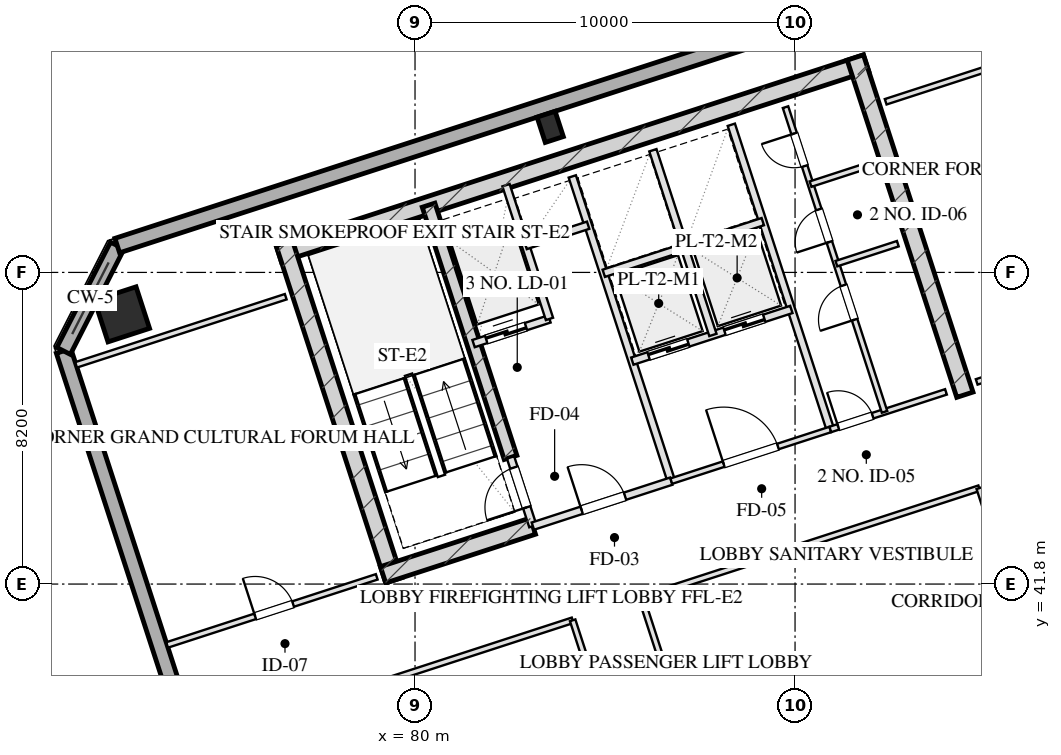
"""IFC4 building model, lengths in metres.
Left out: names, types, materials, properties, quantities, classifications, styles, units other than length and angle.
Written with IfcOpenShell. Run it as: python <this file> out.ifc"""

import sys

from ifc_helpers import new_model, si_unit, direction, frame, frame_2d, origin, origin_2d, place, context, subcontext, project, spatial, rectangle, hollow_rectangle, extrude, element, fill, save


model = new_model("IFC4")
c1 = context("Model", 3, precision=1e-05, world=origin(), true_north=direction((0.0, 1.0)))
c2 = subcontext(c1, "Body", "Model", "MODEL_VIEW")
j1 = project(units=[si_unit("LENGTHUNIT", "METRE"), si_unit("PLANEANGLEUNIT", "RADIAN")], contexts=[c1])
p1 = place(None, origin())
s1 = spatial("IfcSite", under=j1, at=p1, CompositionType="ELEMENT")
p2 = place(p1, origin())
s2 = spatial("IfcBuilding", under=s1, at=p2, CompositionType="ELEMENT")
p3 = place(p2, frame((0.0, 0.0, 202.4)))
s3 = spatial("IfcBuildingStorey", under=s2, at=p3, CompositionType="ELEMENT", Elevation=202.4)
p4 = place(p3, frame((76.415, 50.489, 0.0), z_axis=(0.0, 0.0, 1.0), x_axis=(0.951056810414, 0.309016089169, 0.0)))
e1 = element("IfcWall", 1, at=p4, inside=s3, PredefinedType="SHEAR", context=c2, shape_type="SweptSolid", body=[
    extrude(rectangle(XDim=16.25, YDim=0.45, at=frame_2d((8.125, 0.0))), origin(), (0.0, 0.0, 1.0), 3.45),
])
for number, where, z_axis, x_axis in (
    (2, (79.442, 41.899, 0.0), (0.0, 0.0, 1.0), (-0.309, 0.951, 0.0)),
    (3, (94.469, 46.781, 0.0), (0.0, 0.0, 1.0), (-0.309, 0.951, 0.0)),
):
    element("IfcWall", number, at=place(p3, frame(where, z_axis=z_axis, x_axis=x_axis)), inside=s3, PredefinedType="SHEAR", context=c2, shape_type="SweptSolid", body=[
        extrude(rectangle(XDim=9.33, YDim=0.45, at=frame_2d((4.665, 0.0))), origin(), (0.0, 0.0, 1.0), 3.45),
    ])
p5 = place(p3, frame((82.514, 45.131, 0.0), z_axis=(0.0, 0.0, 1.0), x_axis=(-0.308988790936, 0.951065679686, 0.0)))
e4 = element("IfcWall", 4, at=p5, inside=s3, PredefinedType="SHEAR", context=c2, shape_type="SweptSolid", body=[
    extrude(rectangle(XDim=6.98, YDim=0.35, at=frame_2d((3.49, 0.0))), origin(), (0.0, 0.0, 1.0), 3.45),
])
p6 = place(p3, frame((79.159, 42.043, 0.0), z_axis=(0.0, 0.0, 1.0), x_axis=(0.951047485828, 0.309044785913, 0.0)))
e5 = element("IfcWall", 5, at=p6, inside=s3, PredefinedType="SHEAR", context=c2, shape_type="SweptSolid", body=[
    extrude(rectangle(XDim=4.145, YDim=0.45, at=frame_2d((2.073, 0.0))), origin(), (0.0, 0.0, 1.0), 3.45),
])
for number, where, z_axis, x_axis in (
    (6, (95.572, 56.461, 0.0), (0.0, 0.0, 1.0), (0.951, 0.309, 0.0)),
    (7, (72.29, 48.896, 0.0), (0.0, 0.0, 1.0), (0.951, 0.309, 0.0)),
):
    element("IfcColumn", number, at=place(p3, frame(where, z_axis=z_axis, x_axis=x_axis)), inside=s3, PredefinedType="COLUMN", context=c2, shape_type="SweptSolid", body=[
        extrude(hollow_rectangle(XDim=1.15, YDim=1.15, WallThickness=0.04, at=origin_2d()), origin(), (0.0, 0.0, 1.0), 3.451),
    ])
p7 = place(p3, frame((83.557, 53.83, 0.0), z_axis=(0.0, 0.0, 1.0), x_axis=(0.951056516295, 0.309016994375, 0.0)))
e8 = element("IfcColumn", 8, at=p7, inside=s3, PredefinedType="COLUMN", context=c2, shape_type="SweptSolid", body=[
    extrude(hollow_rectangle(XDim=0.5, YDim=0.7, WallThickness=0.025, at=origin_2d()), origin(), (0.0, 0.0, 1.0), 3.451),
])
p8 = place(p3, frame((82.618, 11.414, 0.0), z_axis=(0.0, 0.0, 1.0), x_axis=(-0.309016491071, 0.951056679828, 0.0)))
e9 = element("IfcWall", 9, at=p8, inside=s3, PredefinedType="SOLIDWALL", context=c2, shape_type="SweptSolid", body=[
    extrude(rectangle(XDim=38.4, YDim=0.4, at=frame_2d((19.2, 0.0))), origin(), (0.0, 0.0, 1.0), 2.61),
])
p9 = place(p8, frame((11.75, 0.0, 0.75)))
e10 = element("IfcOpeningElement", 10, at=p9, cuts=e9, PredefinedType="OPENING", context=c2, shape_type="SweptSolid", body=[
    extrude(rectangle(XDim=2.1, YDim=1.46, at=frame_2d((1.05, 0.73))), frame((0.0, 0.21, 0.0), z_axis=(0.0, -1.0, 0.0), x_axis=(1.0, 0.0, 0.0)), (0.0, 0.0, 1.0), 0.42),
])
p10 = place(p8, frame((15.55, 0.0, 0.75)))
e11 = element("IfcOpeningElement", 11, at=p10, cuts=e9, PredefinedType="OPENING", context=c2, shape_type="SweptSolid", body=[
    extrude(rectangle(XDim=2.1, YDim=1.46, at=frame_2d((1.05, 0.73))), frame((0.0, 0.21, 0.0), z_axis=(0.0, -1.0, 0.0), x_axis=(1.0, 0.0, 0.0)), (0.0, 0.0, 1.0), 0.42),
])
p11 = place(p8, frame((20.75, 0.0, 0.75)))
e12 = element("IfcOpeningElement", 12, at=p11, cuts=e9, PredefinedType="OPENING", context=c2, shape_type="SweptSolid", body=[
    extrude(rectangle(XDim=2.1, YDim=1.46, at=frame_2d((1.05, 0.73))), frame((0.0, 0.21, 0.0), z_axis=(0.0, -1.0, 0.0), x_axis=(1.0, 0.0, 0.0)), (0.0, 0.0, 1.0), 0.42),
])
p12 = place(p8, frame((24.55, 0.0, 0.75)))
e13 = element("IfcOpeningElement", 13, at=p12, cuts=e9, PredefinedType="OPENING", context=c2, shape_type="SweptSolid", body=[
    extrude(rectangle(XDim=2.1, YDim=1.46, at=frame_2d((1.05, 0.73))), frame((0.0, 0.21, 0.0), z_axis=(0.0, -1.0, 0.0), x_axis=(1.0, 0.0, 0.0)), (0.0, 0.0, 1.0), 0.42),
])
p13 = place(p3, frame((70.752, 47.934, 0.0), z_axis=(0.0, 0.0, 1.0), x_axis=(0.453949291228, 0.891027519774, 0.0)))
e14 = element("IfcWall", 14, at=p13, inside=s3, PredefinedType="SOLIDWALL", context=c2, shape_type="SweptSolid", body=[
    extrude(rectangle(XDim=3.111, YDim=0.4, at=frame_2d((1.556, 0.0))), origin(), (0.0, 0.0, 1.0), 2.61),
])
p14 = place(p3, frame((72.165, 50.706, 0.0), z_axis=(0.0, 0.0, 1.0), x_axis=(0.951058012937, 0.309012388148, 0.0)))
e15 = element("IfcWall", 15, at=p14, inside=s3, PredefinedType="SOLIDWALL", context=c2, shape_type="SweptSolid", body=[
    extrude(rectangle(XDim=23.6, YDim=0.4, at=frame_2d((11.8, 0.0))), origin(), (0.0, 0.0, 1.0), 2.61),
])
p15 = place(p3, frame((83.101, 43.324, 0.0), z_axis=(0.0, 0.0, 1.0), x_axis=(-0.309048298632, 0.951046344356, 0.0)))
e16 = element("IfcWall", 16, at=p15, inside=s3, PredefinedType="PARTITIONING", context=c2, shape_type="SweptSolid", body=[
    extrude(rectangle(XDim=1.9, YDim=0.2, at=frame_2d((0.95, 0.0))), origin(), (0.0, 0.0, 1.0), 3.175),
])
p16 = place(p15, frame((0.52, 0.0, 0.0)))
e17 = element("IfcOpeningElement", 17, at=p16, cuts=e16, PredefinedType="OPENING", context=c2, shape_type="SweptSolid", body=[
    extrude(rectangle(XDim=1.1, YDim=2.05, at=frame_2d((0.55, 1.025))), frame((0.0, 0.11, 0.0), z_axis=(0.0, -1.0, 0.0), x_axis=(1.0, 0.0, 0.0)), (0.0, 0.0, 1.0), 0.22),
])
p17 = place(p3, frame((86.743, 44.508, 0.0), z_axis=(0.0, 0.0, 1.0), x_axis=(-0.309016001439, 0.951056838919, 0.0)))
e18 = element("IfcWall", 18, at=p17, inside=s3, PredefinedType="PARTITIONING", context=c2, shape_type="SweptSolid", body=[
    extrude(rectangle(XDim=8.43, YDim=0.2, at=frame_2d((4.215, 0.0))), origin(), (0.0, 0.0, 1.0), 3.175),
])
p18 = place(p3, frame((83.101, 43.324, 0.0), z_axis=(0.0, 0.0, 1.0), x_axis=(0.951052804469, 0.309028417967, 0.0)))
e19 = element("IfcWall", 19, at=p18, inside=s3, PredefinedType="PARTITIONING", context=c2, shape_type="SweptSolid", body=[
    extrude(rectangle(XDim=3.83, YDim=0.2, at=frame_2d((1.915, 0.0))), origin(), (0.0, 0.0, 1.0), 3.175),
])
p19 = place(p18, frame((1.35, 0.0, 0.0)))
e20 = element("IfcOpeningElement", 20, at=p19, cuts=e19, PredefinedType="OPENING", context=c2, shape_type="SweptSolid", body=[
    extrude(rectangle(XDim=1.2, YDim=2.05, at=frame_2d((0.6, 1.025))), frame((0.0, 0.11, 0.0), z_axis=(0.0, -1.0, 0.0), x_axis=(1.0, 0.0, 0.0)), (0.0, 0.0, 1.0), 0.22),
])
p20 = place(p3, frame((81.54, 48.127, 0.0), z_axis=(0.0, 0.0, 1.0), x_axis=(0.951062257173, 0.308999325213, 0.0)))
e21 = element("IfcWall", 21, at=p20, inside=s3, PredefinedType="PARTITIONING", context=c2, shape_type="SweptSolid", body=[
    extrude(rectangle(XDim=2.1, YDim=0.2, at=frame_2d((1.05, 0.0))), origin(), (0.0, 0.0, 1.0), 3.175),
])
p21 = place(p20, frame((0.35, 0.0, 0.0)))
e22 = element("IfcOpeningElement", 22, at=p21, cuts=e21, PredefinedType="OPENING", context=c2, shape_type="SweptSolid", body=[
    extrude(rectangle(XDim=1.1, YDim=2.05, at=frame_2d((0.55, 1.025))), frame((0.0, 0.11, 0.0), z_axis=(0.0, -1.0, 0.0), x_axis=(1.0, 0.0, 0.0)), (0.0, 0.0, 1.0), 0.22),
])
p22 = place(p3, frame((83.538, 48.776, 0.0), z_axis=(0.0, 0.0, 1.0), x_axis=(-0.3089935693, 0.951064127245, 0.0)))
e23 = element("IfcWall", 23, at=p22, inside=s3, PredefinedType="PARTITIONING", context=c2, shape_type="SweptSolid", body=[
    extrude(rectangle(XDim=3.7, YDim=0.2, at=frame_2d((1.85, 0.0))), origin(), (0.0, 0.0, 1.0), 3.175),
])
p23 = place(p3, frame((82.91, 50.707, 0.0), z_axis=(0.0, 0.0, 1.0), x_axis=(0.951041328149, 0.309063734775, 0.0)))
e24 = element("IfcWall", 24, at=p23, inside=s3, PredefinedType="PARTITIONING", context=c2, shape_type="SweptSolid", body=[
    extrude(rectangle(XDim=1.73, YDim=0.2, at=frame_2d((0.865, 0.0))), origin(), (0.0, 0.0, 1.0), 3.175),
])
p24 = place(p3, frame((90.928, 45.868, 0.0), z_axis=(0.0, 0.0, 1.0), x_axis=(-0.309042196757, 0.951048327176, 0.0)))
e25 = element("IfcWall", 25, at=p24, inside=s3, PredefinedType="PARTITIONING", context=c2, shape_type="SweptSolid", body=[
    extrude(rectangle(XDim=8.43, YDim=0.2, at=frame_2d((4.215, 0.0))), origin(), (0.0, 0.0, 1.0), 3.175),
])
p25 = place(p3, frame((86.743, 44.508, 0.0), z_axis=(0.0, 0.0, 1.0), x_axis=(0.951063829732, 0.308994485023, 0.0)))
e26 = element("IfcWall", 26, at=p25, inside=s3, PredefinedType="PARTITIONING", context=c2, shape_type="SweptSolid", body=[
    extrude(rectangle(XDim=4.4, YDim=0.15, at=frame_2d((2.2, 0.0))), origin(), (0.0, 0.0, 1.0), 3.175),
])
p26 = place(p25, frame((1.45, 0.0, 0.0)))
e27 = element("IfcOpeningElement", 27, at=p26, cuts=e26, PredefinedType="OPENING", context=c2, shape_type="SweptSolid", body=[
    extrude(rectangle(XDim=1.5, YDim=2.05, at=frame_2d((0.75, 1.025))), frame((0.0, 0.085, 0.0), z_axis=(0.0, -1.0, 0.0), x_axis=(1.0, 0.0, 0.0)), (0.0, 0.0, 1.0), 0.17),
])
p27 = place(p3, frame((85.718, 47.666, 0.0), z_axis=(0.0, 0.0, 1.0), x_axis=(0.951058531764, 0.30901079133, 0.0)))
e28 = element("IfcWall", 28, at=p27, inside=s3, PredefinedType="PARTITIONING", context=c2, shape_type="SweptSolid", body=[
    extrude(rectangle(XDim=4.4, YDim=0.2, at=frame_2d((2.2, 0.0))), origin(), (0.0, 0.0, 1.0), 3.175),
])
p28 = place(p27, frame((0.45, 0.0, 0.0)))
e29 = element("IfcOpeningElement", 29, at=p28, cuts=e28, PredefinedType="OPENING", context=c2, shape_type="SweptSolid", body=[
    extrude(rectangle(XDim=1.1, YDim=2.05, at=frame_2d((0.55, 1.025))), frame((0.0, 0.11, 0.0), z_axis=(0.0, -1.0, 0.0), x_axis=(1.0, 0.0, 0.0)), (0.0, 0.0, 1.0), 0.22),
])
p29 = place(p27, frame((2.55, 0.0, 0.0)))
e30 = element("IfcOpeningElement", 30, at=p29, cuts=e28, PredefinedType="OPENING", context=c2, shape_type="SweptSolid", body=[
    extrude(rectangle(XDim=1.1, YDim=2.05, at=frame_2d((0.55, 1.025))), frame((0.0, 0.11, 0.0), z_axis=(0.0, -1.0, 0.0), x_axis=(1.0, 0.0, 0.0)), (0.0, 0.0, 1.0), 0.22),
])
p30 = place(p3, frame((87.838, 48.354, 0.0), z_axis=(0.0, 0.0, 1.0), x_axis=(-0.3090093719, 0.951058992953, 0.0)))
e31 = element("IfcWall", 31, at=p30, inside=s3, PredefinedType="PARTITIONING", context=c2, shape_type="SweptSolid", body=[
    extrude(rectangle(XDim=5.11, YDim=0.2, at=frame_2d((2.555, 0.0))), origin(), (0.0, 0.0, 1.0), 3.175),
])
p31 = place(p3, frame((84.967, 49.977, 0.0), z_axis=(0.0, 0.0, 1.0), x_axis=(0.951063829732, 0.308994485023, 0.0)))
e32 = element("IfcWall", 32, at=p31, inside=s3, PredefinedType="PARTITIONING", context=c2, shape_type="SweptSolid", body=[
    extrude(rectangle(XDim=4.4, YDim=0.2, at=frame_2d((2.2, 0.0))), origin(), (0.0, 0.0, 1.0), 3.175),
])
p32 = place(p3, frame((90.928, 45.868, 0.0), z_axis=(0.0, 0.0, 1.0), x_axis=(0.951059297078, 0.309008435874, 0.0)))
e33 = element("IfcWall", 33, at=p32, inside=s3, PredefinedType="PARTITIONING", context=c2, shape_type="SweptSolid", body=[
    extrude(rectangle(XDim=3.2, YDim=0.15, at=frame_2d((1.6, 0.0))), origin(), (0.0, 0.0, 1.0), 3.175),
])
p33 = place(p32, frame((0.22, 0.0, 0.0)))
e34 = element("IfcOpeningElement", 34, at=p33, cuts=e33, PredefinedType="OPENING", context=c2, shape_type="SweptSolid", body=[
    extrude(rectangle(XDim=0.95, YDim=2.05, at=frame_2d((0.475, 1.025))), frame((0.0, 0.085, 0.0), z_axis=(0.0, -1.0, 0.0), x_axis=(1.0, 0.0, 0.0)), (0.0, 0.0, 1.0), 0.17),
])
p34 = place(p3, frame((92.355, 46.331, 0.0), z_axis=(0.0, 0.0, 1.0), x_axis=(-0.309007490203, 0.951059604335, 0.0)))
e35 = element("IfcWall", 35, at=p34, inside=s3, PredefinedType="PARTITIONING", context=c2, shape_type="SweptSolid", body=[
    extrude(rectangle(XDim=8.43, YDim=0.15, at=frame_2d((4.215, 0.0))), origin(), (0.0, 0.0, 1.0), 3.175),
])
p35 = place(p34, frame((2.55, 0.0, 0.0)))
e36 = element("IfcOpeningElement", 36, at=p35, cuts=e35, PredefinedType="OPENING", context=c2, shape_type="SweptSolid", body=[
    extrude(rectangle(XDim=0.95, YDim=2.05, at=frame_2d((0.475, 1.025))), frame((0.0, 0.085, 0.0), z_axis=(0.0, -1.0, 0.0), x_axis=(1.0, 0.0, 0.0)), (0.0, 0.0, 1.0), 0.17),
])
p36 = place(p34, frame((4.7, 0.0, 0.0)))
e37 = element("IfcOpeningElement", 37, at=p36, cuts=e35, PredefinedType="OPENING", context=c2, shape_type="SweptSolid", body=[
    extrude(rectangle(XDim=0.9, YDim=2.05, at=frame_2d((0.45, 1.025))), frame((0.0, 0.085, 0.0), z_axis=(0.0, -1.0, 0.0), x_axis=(1.0, 0.0, 0.0)), (0.0, 0.0, 1.0), 0.17),
])
p37 = place(p34, frame((6.8, 0.0, 0.0)))
e38 = element("IfcOpeningElement", 38, at=p37, cuts=e35, PredefinedType="OPENING", context=c2, shape_type="SweptSolid", body=[
    extrude(rectangle(XDim=0.9, YDim=2.05, at=frame_2d((0.45, 1.025))), frame((0.0, 0.085, 0.0), z_axis=(0.0, -1.0, 0.0), x_axis=(1.0, 0.0, 0.0)), (0.0, 0.0, 1.0), 0.17),
])
p38 = place(p3, frame((91.088, 50.23, 0.0), z_axis=(0.0, 0.0, 1.0), x_axis=(0.951054116971, 0.309024378638, 0.0)))
e39 = element("IfcWall", 39, at=p38, inside=s3, PredefinedType="PARTITIONING", context=c2, shape_type="SweptSolid", body=[
    extrude(rectangle(XDim=1.7, YDim=0.15, at=frame_2d((0.85, 0.0))), origin(), (0.0, 0.0, 1.0), 3.175),
])
p39 = place(p3, frame((90.408, 52.323, 0.0), z_axis=(0.0, 0.0, 1.0), x_axis=(0.951040401051, 0.309066587596, 0.0)))
e40 = element("IfcWall", 40, at=p39, inside=s3, PredefinedType="PARTITIONING", context=c2, shape_type="SweptSolid", body=[
    extrude(rectangle(XDim=1.7, YDim=0.15, at=frame_2d((0.85, 0.0))), origin(), (0.0, 0.0, 1.0), 3.175),
])
p40 = place(p3, frame((71.081, 47.568, 0.0), z_axis=(0.0, 0.0, 1.0), x_axis=(0.951059431056, 0.309008023519, 0.0)))
e41 = element("IfcWall", 41, at=p40, inside=s3, PredefinedType="PARTITIONING", context=c2, shape_type="SweptSolid", body=[
    extrude(rectangle(XDim=5.8, YDim=0.15, at=frame_2d((2.9, 0.0))), origin(), (0.0, 0.0, 1.0), 3.175),
])
p41 = place(p3, frame((73.476, 40.197, 0.0), z_axis=(0.0, 0.0, 1.0), x_axis=(0.951059431056, 0.309008023519, 0.0)))
e42 = element("IfcWall", 42, at=p41, inside=s3, PredefinedType="PARTITIONING", context=c2, shape_type="SweptSolid", body=[
    extrude(rectangle(XDim=5.8, YDim=0.15, at=frame_2d((2.9, 0.0))), origin(), (0.0, 0.0, 1.0), 3.175),
])
p42 = place(p41, frame((2.436, 0.0, 0.0)))
e43 = element("IfcOpeningElement", 43, at=p42, cuts=e42, PredefinedType="OPENING", context=c2, shape_type="SweptSolid", body=[
    extrude(rectangle(XDim=1.05, YDim=2.05, at=frame_2d((0.525, 1.025))), frame((0.0, 0.085, 0.0), z_axis=(0.0, -1.0, 0.0), x_axis=(1.0, 0.0, 0.0)), (0.0, 0.0, 1.0), 0.17),
])
p43 = place(p3, frame((92.385, 54.49, 0.0), z_axis=(0.0, 0.0, 1.0), x_axis=(0.951055112834, 0.309021313752, 0.0)))
e44 = element("IfcWall", 44, at=p43, inside=s3, PredefinedType="PARTITIONING", context=c2, shape_type="SweptSolid", body=[
    extrude(rectangle(XDim=5.2, YDim=0.15, at=frame_2d((2.6, 0.0))), origin(), (0.0, 0.0, 1.0), 3.175),
])
p44 = place(p3, frame((94.78, 47.119, 0.0), z_axis=(0.0, 0.0, 1.0), x_axis=(0.951055112834, 0.309021313752, 0.0)))
e45 = element("IfcWall", 45, at=p44, inside=s3, PredefinedType="PARTITIONING", context=c2, shape_type="SweptSolid", body=[
    extrude(rectangle(XDim=5.2, YDim=0.15, at=frame_2d((2.6, 0.0))), origin(), (0.0, 0.0, 1.0), 3.175),
])
p45 = place(p44, frame((2.184, 0.0, 0.0)))
e46 = element("IfcOpeningElement", 46, at=p45, cuts=e45, PredefinedType="OPENING", context=c2, shape_type="SweptSolid", body=[
    extrude(rectangle(XDim=1.0, YDim=2.05, at=frame_2d((0.5, 1.025))), frame((0.0, 0.085, 0.0), z_axis=(0.0, -1.0, 0.0), x_axis=(1.0, 0.0, 0.0)), (0.0, 0.0, 1.0), 0.17),
])
p46 = place(p3, frame((74.304, 37.648, 0.0), z_axis=(0.0, 0.0, 1.0), x_axis=(0.951059547341, 0.309007665621, 0.0)))
e47 = element("IfcWall", 47, at=p46, inside=s3, PredefinedType="PARTITIONING", context=c2, shape_type="SweptSolid", body=[
    extrude(rectangle(XDim=10.35, YDim=0.15, at=frame_2d((5.175, 0.0))), origin(), (0.0, 0.0, 1.0), 3.175),
])
p47 = place(p3, frame((85.955, 41.434, 0.0), z_axis=(0.0, 0.0, 1.0), x_axis=(0.951053063704, 0.309027620156, 0.0)))
e48 = element("IfcWall", 48, at=p47, inside=s3, PredefinedType="PARTITIONING", context=c2, shape_type="SweptSolid", body=[
    extrude(rectangle(XDim=9.35, YDim=0.15, at=frame_2d((4.675, 0.0))), origin(), (0.0, 0.0, 1.0), 3.175),
])
p48 = place(p3, frame((89.29, 25.021, 0.0), z_axis=(0.0, 0.0, 1.0), x_axis=(-0.309004459387, 0.951060589068, 0.0)))
e49 = element("IfcWall", 49, at=p48, inside=s3, PredefinedType="PARTITIONING", context=c2, shape_type="SweptSolid", body=[
    extrude(rectangle(XDim=16.64, YDim=0.15, at=frame_2d((8.32, 0.0))), origin(), (0.0, 0.0, 1.0), 3.175),
])
p49 = place(p48, frame((3.107, 0.0, 0.0)))
e50 = element("IfcOpeningElement", 50, at=p49, cuts=e49, PredefinedType="OPENING", context=c2, shape_type="SweptSolid", body=[
    extrude(rectangle(XDim=0.85, YDim=2.05, at=frame_2d((0.425, 1.025))), frame((0.0, 0.085, 0.0), z_axis=(0.0, -1.0, 0.0), x_axis=(1.0, 0.0, 0.0)), (0.0, 0.0, 1.0), 0.17),
])
p50 = place(p48, frame((11.427, 0.0, 0.0)))
e51 = element("IfcOpeningElement", 51, at=p50, cuts=e49, PredefinedType="OPENING", context=c2, shape_type="SweptSolid", body=[
    extrude(rectangle(XDim=1.0, YDim=2.05, at=frame_2d((0.5, 1.025))), frame((0.0, 0.085, 0.0), z_axis=(0.0, -1.0, 0.0), x_axis=(1.0, 0.0, 0.0)), (0.0, 0.0, 1.0), 0.17),
])
p51 = place(p3, frame((91.097, 25.608, 0.0), z_axis=(0.0, 0.0, 1.0), x_axis=(-0.30901773025, 0.951056277195, 0.0)))
e52 = element("IfcWall", 52, at=p51, inside=s3, PredefinedType="PARTITIONING", context=c2, shape_type="SweptSolid", body=[
    extrude(rectangle(XDim=16.64, YDim=0.15, at=frame_2d((8.32, 0.0))), origin(), (0.0, 0.0, 1.0), 3.175),
])
p52 = place(p51, frame((7.987, 0.0, 0.0)))
e53 = element("IfcOpeningElement", 53, at=p52, cuts=e52, PredefinedType="OPENING", context=c2, shape_type="SweptSolid", body=[
    extrude(rectangle(XDim=1.1, YDim=2.05, at=frame_2d((0.55, 1.025))), frame((0.0, 0.085, 0.0), z_axis=(0.0, -1.0, 0.0), x_axis=(1.0, 0.0, 0.0)), (0.0, 0.0, 1.0), 0.17),
])
p53 = place(p3, frame((99.989, 28.498, 0.0), z_axis=(0.0, 0.0, 1.0), x_axis=(-0.30901773025, 0.951056277195, 0.0)))
e54 = element("IfcWall", 54, at=p53, inside=s3, PredefinedType="PARTITIONING", context=c2, shape_type="SweptSolid", body=[
    extrude(rectangle(XDim=16.64, YDim=0.15, at=frame_2d((8.32, 0.0))), origin(), (0.0, 0.0, 1.0), 3.175),
])
p54 = place(p16, origin())
e55 = element("IfcDoor", 55, at=p54, inside=s3, OperationType="SINGLE_SWING_LEFT", PredefinedType="DOOR", context=c2, shape_type="SweptSolid", body=[
    extrude(rectangle(XDim=1.1, YDim=2.05, at=frame_2d((0.55, 1.025))), frame((0.0, 0.025, 0.0), z_axis=(0.0, -1.0, 0.0), x_axis=(1.0, 0.0, 0.0)), (0.0, 0.0, 1.0), 0.05),
])
fill(e17, e55)
p55 = place(p19, origin())
e56 = element("IfcDoor", 56, at=p55, inside=s3, OperationType="SINGLE_SWING_LEFT", PredefinedType="DOOR", context=c2, shape_type="SweptSolid", body=[
    extrude(rectangle(XDim=1.2, YDim=2.05, at=frame_2d((0.6, 1.025))), frame((0.0, 0.025, 0.0), z_axis=(0.0, -1.0, 0.0), x_axis=(1.0, 0.0, 0.0)), (0.0, 0.0, 1.0), 0.05),
])
fill(e20, e56)
p56 = place(p21, origin())
e57 = element("IfcDoor", 57, at=p56, inside=s3, OperationType="DOUBLE_DOOR_SLIDING", PredefinedType="DOOR", context=c2, shape_type="SweptSolid", body=[
    extrude(rectangle(XDim=1.1, YDim=2.05, at=frame_2d((0.55, 1.025))), frame((0.0, 0.025, 0.0), z_axis=(0.0, -1.0, 0.0), x_axis=(1.0, 0.0, 0.0)), (0.0, 0.0, 1.0), 0.05),
])
fill(e22, e57)
p57 = place(p26, origin())
e58 = element("IfcDoor", 58, at=p57, inside=s3, OperationType="SINGLE_SWING_LEFT", PredefinedType="DOOR", context=c2, shape_type="SweptSolid", body=[
    extrude(rectangle(XDim=1.5, YDim=2.05, at=frame_2d((0.75, 1.025))), frame((0.0, 0.025, 0.0), z_axis=(0.0, -1.0, 0.0), x_axis=(1.0, 0.0, 0.0)), (0.0, 0.0, 1.0), 0.05),
])
fill(e27, e58)
p58 = place(p28, origin())
e59 = element("IfcDoor", 59, at=p58, inside=s3, OperationType="DOUBLE_DOOR_SLIDING", PredefinedType="DOOR", context=c2, shape_type="SweptSolid", body=[
    extrude(rectangle(XDim=1.1, YDim=2.05, at=frame_2d((0.55, 1.025))), frame((0.0, 0.025, 0.0), z_axis=(0.0, -1.0, 0.0), x_axis=(1.0, 0.0, 0.0)), (0.0, 0.0, 1.0), 0.05),
])
fill(e29, e59)
p59 = place(p29, origin())
e60 = element("IfcDoor", 60, at=p59, inside=s3, OperationType="DOUBLE_DOOR_SLIDING", PredefinedType="DOOR", context=c2, shape_type="SweptSolid", body=[
    extrude(rectangle(XDim=1.1, YDim=2.05, at=frame_2d((0.55, 1.025))), frame((0.0, 0.025, 0.0), z_axis=(0.0, -1.0, 0.0), x_axis=(1.0, 0.0, 0.0)), (0.0, 0.0, 1.0), 0.05),
])
fill(e30, e60)
p60 = place(p33, origin())
e61 = element("IfcDoor", 61, at=p60, inside=s3, OperationType="SINGLE_SWING_LEFT", PredefinedType="DOOR", context=c2, shape_type="SweptSolid", body=[
    extrude(rectangle(XDim=0.95, YDim=2.05, at=frame_2d((0.475, 1.025))), frame((0.0, 0.025, 0.0), z_axis=(0.0, -1.0, 0.0), x_axis=(1.0, 0.0, 0.0)), (0.0, 0.0, 1.0), 0.05),
])
fill(e34, e61)
p61 = place(p35, origin())
e62 = element("IfcDoor", 62, at=p61, inside=s3, OperationType="SINGLE_SWING_LEFT", PredefinedType="DOOR", context=c2, shape_type="SweptSolid", body=[
    extrude(rectangle(XDim=0.95, YDim=2.05, at=frame_2d((0.475, 1.025))), frame((0.0, 0.025, 0.0), z_axis=(0.0, -1.0, 0.0), x_axis=(1.0, 0.0, 0.0)), (0.0, 0.0, 1.0), 0.05),
])
fill(e36, e62)
p62 = place(p36, origin())
e63 = element("IfcDoor", 63, at=p62, inside=s3, OperationType="SINGLE_SWING_LEFT", PredefinedType="DOOR", context=c2, shape_type="SweptSolid", body=[
    extrude(rectangle(XDim=0.9, YDim=2.05, at=frame_2d((0.45, 1.025))), frame((0.0, 0.025, 0.0), z_axis=(0.0, -1.0, 0.0), x_axis=(1.0, 0.0, 0.0)), (0.0, 0.0, 1.0), 0.05),
])
fill(e37, e63)
p63 = place(p37, origin())
e64 = element("IfcDoor", 64, at=p63, inside=s3, OperationType="SINGLE_SWING_RIGHT", PredefinedType="DOOR", context=c2, shape_type="SweptSolid", body=[
    extrude(rectangle(XDim=0.9, YDim=2.05, at=frame_2d((0.45, 1.025))), frame((0.0, 0.025, 0.0), z_axis=(0.0, -1.0, 0.0), x_axis=(1.0, 0.0, 0.0)), (0.0, 0.0, 1.0), 0.05),
])
fill(e38, e64)
p64 = place(p42, origin())
e65 = element("IfcDoor", 65, at=p64, inside=s3, OperationType="SINGLE_SWING_LEFT", PredefinedType="DOOR", context=c2, shape_type="SweptSolid", body=[
    extrude(rectangle(XDim=1.05, YDim=2.05, at=frame_2d((0.525, 1.025))), frame((0.0, 0.025, 0.0), z_axis=(0.0, -1.0, 0.0), x_axis=(1.0, 0.0, 0.0)), (0.0, 0.0, 1.0), 0.05),
])
fill(e43, e65)
save(model, sys.argv[1])
